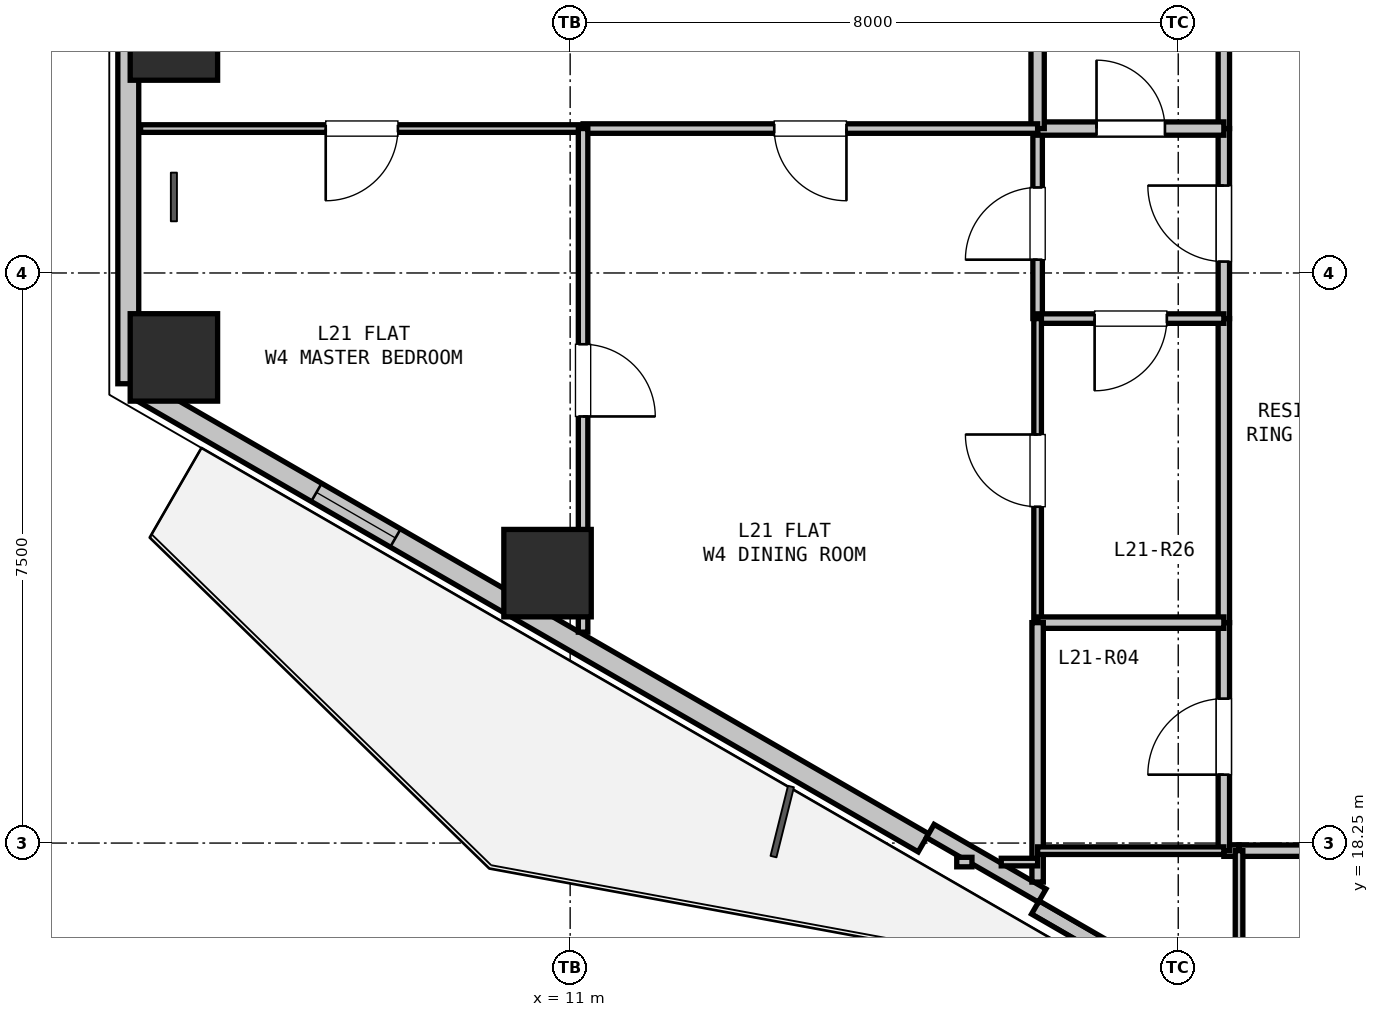
"""IFC4 building model, lengths in metres.
Left out: names, types, materials, properties, quantities, classifications, styles, units other than length and angle.
Written with IfcOpenShell. Run it as: python <this file> out.ifc"""

import sys

from ifc_helpers import new_model, si_unit, direction, frame, frame_2d, origin, origin_2d, place, context, subcontext, project, spatial, rectangle, hollow_rectangle, extrude, element, fill, save


model = new_model("IFC4")
c1 = context("Model", 3, precision=1e-05, world=origin(), true_north=direction((0.0, 1.0)))
c2 = subcontext(c1, "Body", "Model", "MODEL_VIEW")
j1 = project(units=[si_unit("LENGTHUNIT", "METRE"), si_unit("PLANEANGLEUNIT", "RADIAN")], contexts=[c1])
p1 = place(None, origin())
s1 = spatial("IfcSite", under=j1, at=p1, CompositionType="ELEMENT")
p2 = place(p1, origin())
s2 = spatial("IfcBuilding", under=s1, at=p2, CompositionType="ELEMENT")
p3 = place(p2, frame((0.0, 0.0, 80.1)))
s3 = spatial("IfcBuildingStorey", under=s2, at=p3, CompositionType="ELEMENT", Elevation=80.1)
for number, where, z_axis, x_axis in (
    (1, (5.787, 28.861, 0.0), (0.0, 0.0, 1.0), (1.0, 0.0, 0.0)),
    (2, (10.702, 21.801, 0.0), (0.0, 0.0, 1.0), (1.0, 0.0, 0.0)),
    (3, (5.787, 24.639, 0.0), (0.0, 0.0, 1.0), (1.0, 0.0, 0.0)),
):
    element("IfcColumn", number, at=place(p3, frame(where, z_axis=z_axis, x_axis=x_axis)), inside=s3, PredefinedType="COLUMN", context=c2, shape_type="SweptSolid", body=[
        extrude(hollow_rectangle(XDim=1.15, YDim=1.15, WallThickness=0.032, at=origin_2d()), origin(), (0.0, 0.0, 1.0), 3.3),
    ])
p4 = place(p3, frame((5.187, 24.293, 0.0), z_axis=(0.0, 0.0, 1.0), x_axis=(0.0, 1.0, 0.0)))
e4 = element("IfcWall", 4, at=p4, inside=s3, PredefinedType="SOLIDWALL", context=c2, shape_type="SweptSolid", body=[
    extrude(rectangle(XDim=4.915, YDim=0.275, at=frame_2d((2.457, 0.0))), origin(), (0.0, 0.0, 1.0), 2.67),
])
p5 = place(p3, frame((26.845, 11.788, 0.0), z_axis=(0.0, 0.0, 1.0), x_axis=(-0.866027010039, 0.499997217876, 0.0)))
e5 = element("IfcWall", 5, at=p5, inside=s3, PredefinedType="PARAPET", context=c2, shape_type="SweptSolid", body=[
    extrude(rectangle(XDim=11.229, YDim=0.2, at=frame_2d((5.615, 0.0))), origin(), (0.0, 0.0, 1.0), 0.2),
])
p6 = place(p3, frame((15.648, 18.253, 0.0), z_axis=(0.0, 0.0, 1.0), x_axis=(-0.866023023012, 0.500004123596, 0.0)))
e6 = element("IfcWall", 6, at=p6, inside=s3, PredefinedType="SOLIDWALL", context=c2, shape_type="SweptSolid", body=[
    extrude(rectangle(XDim=11.93, YDim=0.275, at=frame_2d((5.965, 0.0))), origin(), (0.0, 0.0, 1.0), 2.67),
])
p7 = place(p6, frame((8.021, 0.0, 0.9)))
e7 = element("IfcOpeningElement", 7, at=p7, cuts=e6, PredefinedType="OPENING", context=c2, shape_type="SweptSolid", body=[
    extrude(rectangle(XDim=1.2, YDim=1.4, at=frame_2d((0.6, 0.7))), frame((0.0, 0.147, 0.0), z_axis=(0.0, -1.0, 0.0), x_axis=(1.0, 0.0, 0.0)), (0.0, 0.0, 1.0), 0.295),
])
p8 = place(p3, frame((17.21, 17.559, 0.0), z_axis=(0.0, 0.0, 1.0), x_axis=(-0.866025371046, 0.500000056704, 0.0)))
e8 = element("IfcWall", 8, at=p8, inside=s3, PredefinedType="PARAPET", context=c2, shape_type="SweptSolid", body=[
    extrude(rectangle(XDim=1.7, YDim=0.2, at=frame_2d((0.85, 0.0))), origin(), (0.0, 0.0, 1.0), 2.67),
])
p9 = place(p3, frame((22.6, 18.15, 0.0), z_axis=(0.0, 0.0, 1.0), x_axis=(-1.0, 0.0, 0.0)))
e9 = element("IfcWall", 9, at=p9, inside=s3, PredefinedType="PARTITIONING", context=c2, shape_type="SweptSolid", body=[
    extrude(rectangle(XDim=2.8, YDim=0.15, at=frame_2d((1.4, 0.0))), origin(), (0.0, 0.0, 1.0), 3.05),
])
p10 = place(p9, frame((0.9, 0.0, 0.0)))
e10 = element("IfcOpeningElement", 10, at=p10, cuts=e9, PredefinedType="OPENING", context=c2, shape_type="SweptSolid", body=[
    extrude(rectangle(XDim=1.0, YDim=2.15, at=frame_2d((0.5, 1.075))), frame((0.0, 0.085, 0.0), z_axis=(0.0, -1.0, 0.0), x_axis=(1.0, 0.0, 0.0)), (0.0, 0.0, 1.0), 0.17),
])
p11 = place(p3, frame((19.8, 18.15, 0.0), z_axis=(0.0, 0.0, 1.0), x_axis=(-1.0, 0.0, 0.0)))
e11 = element("IfcWall", 11, at=p11, inside=s3, PredefinedType="PARTITIONING", context=c2, shape_type="SweptSolid", body=[
    extrude(rectangle(XDim=0.2, YDim=0.15, at=frame_2d((0.1, 0.0))), origin(), (0.0, 0.0, 1.0), 3.05),
])
p12 = place(p3, frame((19.6, 18.15, 0.0), z_axis=(0.0, 0.0, 1.0), x_axis=(0.0, 1.0, 0.0)))
e12 = element("IfcWall", 12, at=p12, inside=s3, PredefinedType="PARTITIONING", context=c2, shape_type="SweptSolid", body=[
    extrude(rectangle(XDim=3.0, YDim=0.15, at=frame_2d((1.5, 0.0))), origin(), (0.0, 0.0, 1.0), 2.423),
])
p13 = place(p12, frame((1.0, 0.0, 0.0)))
e13 = element("IfcOpeningElement", 13, at=p13, cuts=e12, PredefinedType="OPENING", context=c2, shape_type="SweptSolid", body=[
    extrude(rectangle(XDim=1.0, YDim=2.15, at=frame_2d((0.5, 1.075))), frame((0.0, 0.085, 0.0), z_axis=(0.0, -1.0, 0.0), x_axis=(1.0, 0.0, 0.0)), (0.0, 0.0, 1.0), 0.17),
])
p14 = place(p3, frame((19.6, 21.15, 0.0), z_axis=(0.0, 0.0, 1.0), x_axis=(0.0, 1.0, 0.0)))
e14 = element("IfcWall", 14, at=p14, inside=s3, PredefinedType="PARTITIONING", context=c2, shape_type="SweptSolid", body=[
    extrude(rectangle(XDim=4.0, YDim=0.15, at=frame_2d((2.0, 0.0))), origin(), (0.0, 0.0, 1.0), 2.423),
])
p15 = place(p3, frame((19.6, 25.15, 0.0), z_axis=(0.0, 0.0, 1.0), x_axis=(0.0, 1.0, 0.0)))
e15 = element("IfcWall", 15, at=p15, inside=s3, PredefinedType="PARTITIONING", context=c2, shape_type="SweptSolid", body=[
    extrude(rectangle(XDim=2.5, YDim=0.15, at=frame_2d((1.25, 0.0))), origin(), (0.0, 0.0, 1.0), 3.05),
])
p16 = place(p15, frame((0.75, 0.0, 0.0)))
e16 = element("IfcOpeningElement", 16, at=p16, cuts=e15, PredefinedType="OPENING", context=c2, shape_type="SweptSolid", body=[
    extrude(rectangle(XDim=1.0, YDim=2.15, at=frame_2d((0.5, 1.075))), frame((0.0, 0.085, 0.0), z_axis=(0.0, -1.0, 0.0), x_axis=(1.0, 0.0, 0.0)), (0.0, 0.0, 1.0), 0.17),
])
p17 = place(p3, frame((19.6, 27.65, 0.0), z_axis=(0.0, 0.0, 1.0), x_axis=(0.0, 1.0, 0.0)))
e17 = element("IfcWall", 17, at=p17, inside=s3, PredefinedType="PARTITIONING", context=c2, shape_type="SweptSolid", body=[
    extrude(rectangle(XDim=2.1, YDim=0.15, at=frame_2d((1.05, 0.0))), origin(), (0.0, 0.0, 1.0), 3.05),
])
p18 = place(p3, frame((17.15, 25.15, 0.0), z_axis=(0.0, 0.0, 1.0), x_axis=(0.0, 1.0, 0.0)))
e18 = element("IfcWall", 18, at=p18, inside=s3, PredefinedType="PARTITIONING", context=c2, shape_type="SweptSolid", body=[
    extrude(rectangle(XDim=2.5, YDim=0.125, at=frame_2d((1.25, 0.0))), origin(), (0.0, 0.0, 1.0), 3.05),
])
p19 = place(p18, frame((0.775, 0.0, 0.0)))
e19 = element("IfcOpeningElement", 19, at=p19, cuts=e18, PredefinedType="OPENING", context=c2, shape_type="SweptSolid", body=[
    extrude(rectangle(XDim=0.95, YDim=2.1, at=frame_2d((0.475, 1.05))), frame((0.0, 0.073, 0.0), z_axis=(0.0, -1.0, 0.0), x_axis=(1.0, 0.0, 0.0)), (0.0, 0.0, 1.0), 0.145),
])
p20 = place(p3, frame((17.15, 27.65, 0.0), z_axis=(0.0, 0.0, 1.0), x_axis=(1.0, 0.0, 0.0)))
e20 = element("IfcWall", 20, at=p20, inside=s3, PredefinedType="PLUMBINGWALL", context=c2, shape_type="SweptSolid", body=[
    extrude(rectangle(XDim=2.45, YDim=0.175, at=frame_2d((1.225, 0.0))), origin(), (0.0, 0.0, 1.0), 3.05),
])
p21 = place(p20, frame((0.775, 0.0, 0.0)))
e21 = element("IfcOpeningElement", 21, at=p21, cuts=e20, PredefinedType="OPENING", context=c2, shape_type="SweptSolid", body=[
    extrude(rectangle(XDim=0.9, YDim=2.1, at=frame_2d((0.45, 1.05))), frame((0.0, 0.097, 0.0), z_axis=(0.0, -1.0, 0.0), x_axis=(1.0, 0.0, 0.0)), (0.0, 0.0, 1.0), 0.195),
])
p22 = place(p3, frame((19.6, 25.15, 0.0), z_axis=(0.0, 0.0, 1.0), x_axis=(-1.0, 0.0, 0.0)))
e22 = element("IfcWall", 22, at=p22, inside=s3, PredefinedType="PARTITIONING", context=c2, shape_type="SweptSolid", body=[
    extrude(rectangle(XDim=2.45, YDim=0.125, at=frame_2d((1.225, 0.0))), origin(), (0.0, 0.0, 1.0), 3.05),
])
p23 = place(p22, frame((0.75, 0.0, 0.0)))
e23 = element("IfcOpeningElement", 23, at=p23, cuts=e22, PredefinedType="OPENING", context=c2, shape_type="SweptSolid", body=[
    extrude(rectangle(XDim=0.95, YDim=2.1, at=frame_2d((0.475, 1.05))), frame((0.0, 0.073, 0.0), z_axis=(0.0, -1.0, 0.0), x_axis=(1.0, 0.0, 0.0)), (0.0, 0.0, 1.0), 0.145),
])
p24 = place(p3, frame((17.15, 27.65, 0.0), z_axis=(0.0, 0.0, 1.0), x_axis=(0.0, 1.0, 0.0)))
e24 = element("IfcWall", 24, at=p24, inside=s3, PredefinedType="PLUMBINGWALL", context=c2, shape_type="SweptSolid", body=[
    extrude(rectangle(XDim=2.1, YDim=0.175, at=frame_2d((1.05, 0.0))), origin(), (0.0, 0.0, 1.0), 3.05),
])
p25 = place(p3, frame((17.15, 21.15, 0.0), z_axis=(0.0, 0.0, 1.0), x_axis=(0.0, 1.0, 0.0)))
e25 = element("IfcWall", 25, at=p25, inside=s3, PredefinedType="PARTITIONING", context=c2, shape_type="SweptSolid", body=[
    extrude(rectangle(XDim=4.0, YDim=0.1, at=frame_2d((2.0, 0.0))), origin(), (0.0, 0.0, 1.0), 2.423),
])
p26 = place(p25, frame((1.525, 0.0, 0.0)))
e26 = element("IfcOpeningElement", 26, at=p26, cuts=e25, PredefinedType="OPENING", context=c2, shape_type="SweptSolid", body=[
    extrude(rectangle(XDim=0.95, YDim=2.1, at=frame_2d((0.475, 1.05))), frame((0.0, 0.06, 0.0), z_axis=(0.0, -1.0, 0.0), x_axis=(1.0, 0.0, 0.0)), (0.0, 0.0, 1.0), 0.12),
])
p27 = place(p3, frame((19.6, 21.15, 0.0), z_axis=(0.0, 0.0, 1.0), x_axis=(-1.0, 0.0, 0.0)))
e27 = element("IfcWall", 27, at=p27, inside=s3, PredefinedType="PARTITIONING", context=c2, shape_type="SweptSolid", body=[
    extrude(rectangle(XDim=2.45, YDim=0.15, at=frame_2d((1.225, 0.0))), origin(), (0.0, 0.0, 1.0), 2.423),
])
p28 = place(p3, frame((17.15, 17.737, 0.0), z_axis=(0.0, 0.0, 1.0), x_axis=(0.0, 1.0, 0.0)))
e28 = element("IfcWall", 28, at=p28, inside=s3, PredefinedType="PARTITIONING", context=c2, shape_type="SweptSolid", body=[
    extrude(rectangle(XDim=3.413, YDim=0.15, at=frame_2d((1.707, 0.0))), origin(), (0.0, 0.0, 1.0), 2.365),
])
p29 = place(p3, frame((19.6, 18.15, 0.0), z_axis=(0.0, 0.0, 1.0), x_axis=(-1.0, 0.0, 0.0)))
e29 = element("IfcWall", 29, at=p29, inside=s3, PredefinedType="PARTITIONING", context=c2, shape_type="SweptSolid", body=[
    extrude(rectangle(XDim=2.45, YDim=0.1, at=frame_2d((1.225, 0.0))), origin(), (0.0, 0.0, 1.0), 2.365),
])
p30 = place(p3, frame((19.8, 15.897, 0.0), z_axis=(0.0, 0.0, 1.0), x_axis=(0.0, 1.0, 0.0)))
e30 = element("IfcWall", 30, at=p30, inside=s3, PredefinedType="PARTITIONING", context=c2, shape_type="SweptSolid", body=[
    extrude(rectangle(XDim=2.252, YDim=0.1, at=frame_2d((1.126, 0.0))), origin(), (0.0, 0.0, 1.0), 2.365),
])
p31 = place(p3, frame((17.15, 27.65, 0.0), z_axis=(0.0, 0.0, 1.0), x_axis=(-1.0, 0.0, 0.0)))
e31 = element("IfcWall", 31, at=p31, inside=s3, PredefinedType="PARTITIONING", context=c2, shape_type="SweptSolid", body=[
    extrude(rectangle(XDim=5.98, YDim=0.125, at=frame_2d((2.99, 0.0))), origin(), (0.0, 0.0, 1.0), 3.05),
])
p32 = place(p31, frame((2.515, 0.0, 0.0)))
e32 = element("IfcOpeningElement", 32, at=p32, cuts=e31, PredefinedType="OPENING", context=c2, shape_type="SweptSolid", body=[
    extrude(rectangle(XDim=0.95, YDim=2.1, at=frame_2d((0.475, 1.05))), frame((0.0, 0.073, 0.0), z_axis=(0.0, -1.0, 0.0), x_axis=(1.0, 0.0, 0.0)), (0.0, 0.0, 1.0), 0.145),
])
p33 = place(p3, frame((11.17, 27.65, 0.0), z_axis=(0.0, 0.0, 1.0), x_axis=(-1.0, 0.0, 0.0)))
e33 = element("IfcWall", 33, at=p33, inside=s3, PredefinedType="PARTITIONING", context=c2, shape_type="SweptSolid", body=[
    extrude(rectangle(XDim=5.822, YDim=0.1, at=frame_2d((2.911, 0.0))), origin(), (0.0, 0.0, 1.0), 2.66),
])
p34 = place(p33, frame((2.436, 0.0, 0.0)))
e34 = element("IfcOpeningElement", 34, at=p34, cuts=e33, PredefinedType="OPENING", context=c2, shape_type="SweptSolid", body=[
    extrude(rectangle(XDim=0.95, YDim=2.1, at=frame_2d((0.475, 1.05))), frame((0.0, 0.06, 0.0), z_axis=(0.0, -1.0, 0.0), x_axis=(1.0, 0.0, 0.0)), (0.0, 0.0, 1.0), 0.12),
])
p35 = place(p3, frame((11.17, 27.65, 0.0), z_axis=(0.0, 0.0, 1.0), x_axis=(0.0, -1.0, 0.0)))
e35 = element("IfcWall", 35, at=p35, inside=s3, PredefinedType="PARTITIONING", context=c2, shape_type="SweptSolid", body=[
    extrude(rectangle(XDim=6.625, YDim=0.125, at=frame_2d((3.312, 0.0))), origin(), (0.0, 0.0, 1.0), 2.365),
])
p36 = place(p35, frame((2.838, 0.0, 0.0)))
e36 = element("IfcOpeningElement", 36, at=p36, cuts=e35, PredefinedType="OPENING", context=c2, shape_type="SweptSolid", body=[
    extrude(rectangle(XDim=0.95, YDim=2.1, at=frame_2d((0.475, 1.05))), frame((0.0, 0.073, 0.0), z_axis=(0.0, -1.0, 0.0), x_axis=(1.0, 0.0, 0.0)), (0.0, 0.0, 1.0), 0.145),
])
p37 = place(p3, frame((17.15, 18.0, 0.0), z_axis=(0.0, 0.0, 1.0), x_axis=(-1.0, 0.0, 0.0)))
e37 = element("IfcWall", 37, at=p37, inside=s3, PredefinedType="PARTITIONING", context=c2, shape_type="SweptSolid", body=[
    extrude(rectangle(XDim=0.478, YDim=0.1, at=frame_2d((0.239, 0.0))), origin(), (0.0, 0.0, 1.0), 2.365),
])
p38 = place(p3, frame((16.286, 18.0, 0.0), z_axis=(0.0, 0.0, 1.0), x_axis=(-1.0, 0.0, 0.0)))
e38 = element("IfcWall", 38, at=p38, inside=s3, PredefinedType="PARTITIONING", context=c2, shape_type="SweptSolid", body=[
    extrude(rectangle(XDim=0.2, YDim=0.125, at=frame_2d((0.1, 0.0))), origin(), (0.0, 0.0, 1.0), 3.05),
])
p39 = place(p7, origin())
e39 = element("IfcWindow", 39, at=p39, inside=s3, PartitioningType="SINGLE_PANEL", PredefinedType="WINDOW", context=c2, shape_type="SweptSolid", body=[
    extrude(rectangle(XDim=1.2, YDim=1.4, at=frame_2d((0.6, 0.7))), frame((0.0, 0.03, 0.0), z_axis=(0.0, -1.0, 0.0), x_axis=(1.0, 0.0, 0.0)), (0.0, 0.0, 1.0), 0.06),
])
fill(e7, e39)
p40 = place(p16, origin())
e40 = element("IfcDoor", 40, at=p40, inside=s3, OperationType="SINGLE_SWING_RIGHT", PredefinedType="DOOR", context=c2, shape_type="SweptSolid", body=[
    extrude(rectangle(XDim=1.0, YDim=2.15, at=frame_2d((0.5, 1.075))), frame((0.0, 0.025, 0.0), z_axis=(0.0, -1.0, 0.0), x_axis=(1.0, 0.0, 0.0)), (0.0, 0.0, 1.0), 0.05),
])
fill(e16, e40)
p41 = place(p13, origin())
e41 = element("IfcDoor", 41, at=p41, inside=s3, OperationType="SINGLE_SWING_LEFT", PredefinedType="DOOR", context=c2, shape_type="SweptSolid", body=[
    extrude(rectangle(XDim=1.0, YDim=2.15, at=frame_2d((0.5, 1.075))), frame((0.0, 0.025, 0.0), z_axis=(0.0, -1.0, 0.0), x_axis=(1.0, 0.0, 0.0)), (0.0, 0.0, 1.0), 0.05),
])
fill(e13, e41)
p42 = place(p21, origin())
e42 = element("IfcDoor", 42, at=p42, inside=s3, OperationType="SINGLE_SWING_LEFT", PredefinedType="DOOR", context=c2, shape_type="SweptSolid", body=[
    extrude(rectangle(XDim=0.9, YDim=2.1, at=frame_2d((0.45, 1.05))), frame((0.0, 0.025, 0.0), z_axis=(0.0, -1.0, 0.0), x_axis=(1.0, 0.0, 0.0)), (0.0, 0.0, 1.0), 0.05),
])
fill(e21, e42)
p43 = place(p23, origin())
e43 = element("IfcDoor", 43, at=p43, inside=s3, OperationType="SINGLE_SWING_RIGHT", PredefinedType="DOOR", context=c2, shape_type="SweptSolid", body=[
    extrude(rectangle(XDim=0.95, YDim=2.1, at=frame_2d((0.475, 1.05))), frame((0.0, 0.025, 0.0), z_axis=(0.0, -1.0, 0.0), x_axis=(1.0, 0.0, 0.0)), (0.0, 0.0, 1.0), 0.05),
])
fill(e23, e43)
p44 = place(p19, origin())
e44 = element("IfcDoor", 44, at=p44, inside=s3, OperationType="SINGLE_SWING_LEFT", PredefinedType="DOOR", context=c2, shape_type="SweptSolid", body=[
    extrude(rectangle(XDim=0.95, YDim=2.1, at=frame_2d((0.475, 1.05))), frame((0.0, 0.025, 0.0), z_axis=(0.0, -1.0, 0.0), x_axis=(1.0, 0.0, 0.0)), (0.0, 0.0, 1.0), 0.05),
])
fill(e19, e44)
p45 = place(p26, origin())
e45 = element("IfcDoor", 45, at=p45, inside=s3, OperationType="SINGLE_SWING_RIGHT", PredefinedType="DOOR", context=c2, shape_type="SweptSolid", body=[
    extrude(rectangle(XDim=0.95, YDim=2.1, at=frame_2d((0.475, 1.05))), frame((0.0, 0.025, 0.0), z_axis=(0.0, -1.0, 0.0), x_axis=(1.0, 0.0, 0.0)), (0.0, 0.0, 1.0), 0.05),
])
fill(e26, e45)
p46 = place(p34, origin())
e46 = element("IfcDoor", 46, at=p46, inside=s3, OperationType="SINGLE_SWING_RIGHT", PredefinedType="DOOR", context=c2, shape_type="SweptSolid", body=[
    extrude(rectangle(XDim=0.95, YDim=2.1, at=frame_2d((0.475, 1.05))), frame((0.0, 0.025, 0.0), z_axis=(0.0, -1.0, 0.0), x_axis=(1.0, 0.0, 0.0)), (0.0, 0.0, 1.0), 0.05),
])
fill(e34, e46)
p47 = place(p32, origin())
e47 = element("IfcDoor", 47, at=p47, inside=s3, OperationType="SINGLE_SWING_LEFT", PredefinedType="DOOR", context=c2, shape_type="SweptSolid", body=[
    extrude(rectangle(XDim=0.95, YDim=2.1, at=frame_2d((0.475, 1.05))), frame((0.0, 0.025, 0.0), z_axis=(0.0, -1.0, 0.0), x_axis=(1.0, 0.0, 0.0)), (0.0, 0.0, 1.0), 0.05),
])
fill(e32, e47)
p48 = place(p36, origin())
e48 = element("IfcDoor", 48, at=p48, inside=s3, OperationType="SINGLE_SWING_RIGHT", PredefinedType="DOOR", context=c2, shape_type="SweptSolid", body=[
    extrude(rectangle(XDim=0.95, YDim=2.1, at=frame_2d((0.475, 1.05))), frame((0.0, 0.025, 0.0), z_axis=(0.0, -1.0, 0.0), x_axis=(1.0, 0.0, 0.0)), (0.0, 0.0, 1.0), 0.05),
])
fill(e36, e48)
save(model, sys.argv[1])
